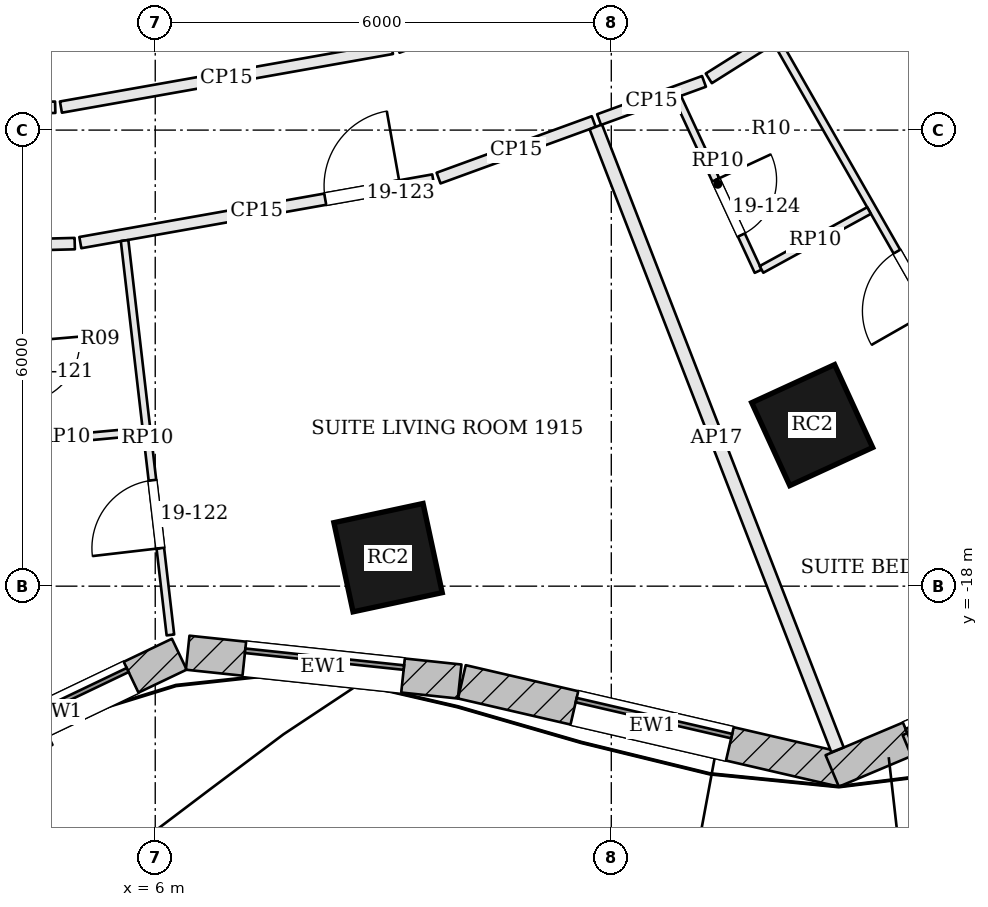
"""IFC4 building model, lengths in metres.
Left out: names, types, materials, properties, quantities, classifications, styles, units other than length and angle.
Written with IfcOpenShell. Run it as: python <this file> out.ifc"""

import sys

from ifc_helpers import new_model, si_unit, direction, frame, frame_2d, origin, origin_2d, place, context, subcontext, project, spatial, rectangle, extrude, element, fill, save


model = new_model("IFC4")
c1 = context("Model", 3, precision=1e-05, world=origin(), true_north=direction((0.0, 1.0)))
c2 = subcontext(c1, "Body", "Model", "MODEL_VIEW")
j1 = project(units=[si_unit("LENGTHUNIT", "METRE"), si_unit("PLANEANGLEUNIT", "RADIAN")], contexts=[c1])
p1 = place(None, origin())
s1 = spatial("IfcSite", under=j1, at=p1, CompositionType="ELEMENT")
p2 = place(p1, origin())
s2 = spatial("IfcBuilding", under=s1, at=p2, CompositionType="ELEMENT")
p3 = place(p2, frame((0.0, 0.0, 85.2)))
s3 = spatial("IfcBuildingStorey", under=s2, at=p3, CompositionType="ELEMENT", Elevation=85.2)
for number, where, z_axis, x_axis in (
    (1, (9.063, -17.625, 0.0), (0.0, 0.0, 1.0), (0.978, 0.21, 0.0)),
    (2, (14.643, -15.881, 0.0), (0.0, 0.0, 1.0), (0.909, 0.417, 0.0)),
):
    element("IfcColumn", number, at=place(p3, frame(where, z_axis=z_axis, x_axis=x_axis)), inside=s3, PredefinedType="COLUMN", context=c2, shape_type="SweptSolid", body=[
        extrude(rectangle(XDim=1.2, YDim=1.2, at=origin_2d()), origin(), (0.0, 0.0, 1.0), 3.6),
    ])
p4 = place(p3, frame((3.154, -20.406, 0.0), z_axis=(0.0, 0.0, 1.0), x_axis=(0.902333313, 0.431038968367, 0.0)))
e3 = element("IfcWall", 3, at=p4, inside=s3, PredefinedType="SOLIDWALL", context=c2, shape_type="SweptSolid", body=[
    extrude(rectangle(XDim=3.505, YDim=0.45, at=frame_2d((1.753, 0.0))), origin(), (0.0, 0.0, 1.0), 3.4),
])
p5 = place(p4, frame((0.703, 0.0, 0.9)))
e4 = element("IfcOpeningElement", 4, at=p5, cuts=e3, PredefinedType="OPENING", context=c2, shape_type="SweptSolid", body=[
    extrude(rectangle(XDim=2.1, YDim=2.0, at=frame_2d((1.05, 1.0))), frame((0.0, 0.235, 0.0), z_axis=(0.0, -1.0, 0.0), x_axis=(1.0, 0.0, 0.0)), (0.0, 0.0, 1.0), 0.47),
])
p6 = place(p3, frame((6.427, -18.875, 0.0), z_axis=(0.0, 0.0, 1.0), x_axis=(0.994433468803, -0.10536638992, 0.0)))
e5 = element("IfcWall", 5, at=p6, inside=s3, PredefinedType="SOLIDWALL", context=c2, shape_type="SweptSolid", body=[
    extrude(rectangle(XDim=3.598, YDim=0.45, at=frame_2d((1.799, 0.0))), origin(), (0.0, 0.0, 1.0), 3.4),
])
p7 = place(p6, frame((0.749, 0.0, 0.9)))
e6 = element("IfcOpeningElement", 6, at=p7, cuts=e5, PredefinedType="OPENING", context=c2, shape_type="SweptSolid", body=[
    extrude(rectangle(XDim=2.1, YDim=2.0, at=frame_2d((1.05, 1.0))), frame((0.0, 0.235, 0.0), z_axis=(0.0, -1.0, 0.0), x_axis=(1.0, 0.0, 0.0)), (0.0, 0.0, 1.0), 0.47),
])
p8 = place(p3, frame((10.034, -19.259, 0.0), z_axis=(0.0, 0.0, 1.0), x_axis=(0.974223567844, -0.225584662283, 0.0)))
e7 = element("IfcWall", 7, at=p8, inside=s3, PredefinedType="SOLIDWALL", context=c2, shape_type="SweptSolid", body=[
    extrude(rectangle(XDim=5.139, YDim=0.45, at=frame_2d((2.569, 0.0))), origin(), (0.0, 0.0, 1.0), 3.4),
])
p9 = place(p8, frame((1.519, 0.0, 0.9)))
e8 = element("IfcOpeningElement", 8, at=p9, cuts=e7, PredefinedType="OPENING", context=c2, shape_type="SweptSolid", body=[
    extrude(rectangle(XDim=2.1, YDim=2.0, at=frame_2d((1.05, 1.0))), frame((0.0, 0.235, 0.0), z_axis=(0.0, -1.0, 0.0), x_axis=(1.0, 0.0, 0.0)), (0.0, 0.0, 1.0), 0.47),
])
p10 = place(p3, frame((14.906, -20.431, 0.0), z_axis=(0.0, 0.0, 1.0), x_axis=(0.921435803521, 0.388530642279, 0.0)))
e9 = element("IfcWall", 9, at=p10, inside=s3, PredefinedType="SOLIDWALL", context=c2, shape_type="SweptSolid", body=[
    extrude(rectangle(XDim=4.309, YDim=0.45, at=frame_2d((2.154, 0.0))), origin(), (0.0, 0.0, 1.0), 3.4),
])
p11 = place(p10, frame((1.104, 0.0, 0.9)))
e10 = element("IfcOpeningElement", 10, at=p11, cuts=e9, PredefinedType="OPENING", context=c2, shape_type="SweptSolid", body=[
    extrude(rectangle(XDim=2.1, YDim=2.0, at=frame_2d((1.05, 1.0))), frame((0.0, 0.235, 0.0), z_axis=(0.0, -1.0, 0.0), x_axis=(1.0, 0.0, 0.0)), (0.0, 0.0, 1.0), 0.47),
])
p12 = place(p3, frame((3.239, -20.594, 3.6), z_axis=(0.0, 0.0, 1.0), x_axis=(0.902344893923, 0.431014724123, 0.0)))
e11 = element("IfcWall", 11, at=p12, inside=s3, PredefinedType="PARAPET", context=c2, shape_type="SweptSolid", body=[
    extrude(rectangle(XDim=1.49, YDim=0.3, at=frame_2d((0.745, 0.0))), origin(), (0.0, 0.0, 1.0), 1.1),
])
p13 = place(p3, frame((15.891, -20.097, 3.6), z_axis=(0.0, 0.0, 1.0), x_axis=(0.921468908678, 0.388452121038, 0.0)))
e12 = element("IfcWall", 12, at=p13, inside=s3, PredefinedType="PARAPET", context=c2, shape_type="SweptSolid", body=[
    extrude(rectangle(XDim=2.099, YDim=0.3, at=frame_2d((1.05, 0.0))), origin(), (0.0, 0.0, 1.0), 1.1),
])
p14 = place(p3, frame((-0.097, -13.624, 0.0), z_axis=(0.0, 0.0, 1.0), x_axis=(0.999664134342, 0.025915603618, 0.0)))
e13 = element("IfcWall", 13, at=p14, inside=s3, PredefinedType="PARTITIONING", context=c2, shape_type="SweptSolid", body=[
    extrude(rectangle(XDim=5.04, YDim=0.15, at=frame_2d((2.52, 0.0))), origin(), (0.0, 0.0, 1.0), 2.784),
])
p15 = place(p3, frame((5.015, -13.48, 0.0), z_axis=(0.0, 0.0, 1.0), x_axis=(0.984637772103, 0.174609443467, 0.0)))
e14 = element("IfcWall", 14, at=p15, inside=s3, PredefinedType="PARTITIONING", context=c2, shape_type="SweptSolid", body=[
    extrude(rectangle(XDim=4.715, YDim=0.15, at=frame_2d((2.357, 0.0))), origin(), (0.0, 0.0, 1.0), 2.784),
])
p16 = place(p15, frame((3.272, 0.0, 0.0)))
e15 = element("IfcOpeningElement", 15, at=p16, cuts=e14, PredefinedType="OPENING", context=c2, shape_type="SweptSolid", body=[
    extrude(rectangle(XDim=1.0, YDim=2.1, at=frame_2d((0.5, 1.05))), frame((0.0, 0.085, 0.0), z_axis=(0.0, -1.0, 0.0), x_axis=(1.0, 0.0, 0.0)), (0.0, 0.0, 1.0), 0.17),
])
p17 = place(p3, frame((9.728, -12.631, 0.0), z_axis=(0.0, 0.0, 1.0), x_axis=(0.939625968265, 0.342203214133, 0.0)))
e16 = element("IfcWall", 16, at=p17, inside=s3, PredefinedType="PARTITIONING", context=c2, shape_type="SweptSolid", body=[
    extrude(rectangle(XDim=2.172, YDim=0.15, at=frame_2d((1.086, 0.0))), origin(), (0.0, 0.0, 1.0), 2.784),
])
p18 = place(p3, frame((14.976, -20.153, 0.0), z_axis=(0.0, 0.0, 1.0), x_axis=(-0.361741189075, 0.932278559298, 0.0)))
e17 = element("IfcWall", 17, at=p18, inside=s3, PredefinedType="PARTITIONING", context=c2, shape_type="SweptSolid", body=[
    extrude(rectangle(XDim=8.791, YDim=0.175, at=frame_2d((4.395, 0.0))), origin(), (0.0, 0.0, 1.0), 2.784),
])
p19 = place(p3, frame((11.839, -11.862, 0.0), z_axis=(0.0, 0.0, 1.0), x_axis=(0.939613732968, 0.342236808099, 0.0)))
e18 = element("IfcWall", 18, at=p19, inside=s3, PredefinedType="PARTITIONING", context=c2, shape_type="SweptSolid", body=[
    extrude(rectangle(XDim=1.469, YDim=0.15, at=frame_2d((0.734, 0.0))), origin(), (0.0, 0.0, 1.0), 2.784),
])
p20 = place(p3, frame((13.283, -11.319, 0.0), z_axis=(0.0, 0.0, 1.0), x_axis=(0.84630789582, 0.532694044901, 0.0)))
e19 = element("IfcWall", 19, at=p20, inside=s3, PredefinedType="PARTITIONING", context=c2, shape_type="SweptSolid", body=[
    extrude(rectangle(XDim=3.53, YDim=0.15, at=frame_2d((1.765, 0.0))), origin(), (0.0, 0.0, 1.0), 2.784),
])
p21 = place(p20, frame((2.25, 0.0, 0.0)))
e20 = element("IfcOpeningElement", 20, at=p21, cuts=e19, PredefinedType="OPENING", context=c2, shape_type="SweptSolid", body=[
    extrude(rectangle(XDim=1.0, YDim=2.1, at=frame_2d((0.5, 1.05))), frame((0.0, 0.085, 0.0), z_axis=(0.0, -1.0, 0.0), x_axis=(1.0, 0.0, 0.0)), (0.0, 0.0, 1.0), 0.17),
])
p22 = place(p3, frame((9.115, -10.925, 0.0), z_axis=(0.0, 0.0, 1.0), x_axis=(-0.984632605417, -0.174638576352, 0.0)))
e21 = element("IfcWall", 21, at=p22, inside=s3, PredefinedType="PARTITIONING", context=c2, shape_type="SweptSolid", body=[
    extrude(rectangle(XDim=4.423, YDim=0.15, at=frame_2d((2.211, 0.0))), origin(), (0.0, 0.0, 1.0), 2.784),
])
p23 = place(p3, frame((4.684, -11.699, 0.0), z_axis=(0.0, 0.0, 1.0), x_axis=(-0.999663438204, -0.025942442425, 0.0)))
e22 = element("IfcWall", 22, at=p23, inside=s3, PredefinedType="PARTITIONING", context=c2, shape_type="SweptSolid", body=[
    extrude(rectangle(XDim=6.663, YDim=0.15, at=frame_2d((3.332, 0.0))), origin(), (0.0, 0.0, 1.0), 2.784),
])
p24 = place(p3, frame((6.199, -18.642, 0.0), z_axis=(0.0, 0.0, 1.0), x_axis=(-0.115390402635, 0.993320217744, 0.0)))
e23 = element("IfcWall", 23, at=p24, inside=s3, PredefinedType="PARTITIONING", context=c2, shape_type="SweptSolid", body=[
    extrude(rectangle(XDim=5.224, YDim=0.1, at=frame_2d((2.612, 0.0))), origin(), (0.0, 0.0, 1.0), 2.784),
])
p25 = place(p24, frame((1.149, 0.0, 0.0)))
e24 = element("IfcOpeningElement", 24, at=p25, cuts=e23, PredefinedType="OPENING", context=c2, shape_type="SweptSolid", body=[
    extrude(rectangle(XDim=0.9, YDim=2.4, at=frame_2d((0.45, 1.2))), frame((0.0, 0.06, 0.0), z_axis=(0.0, -1.0, 0.0), x_axis=(1.0, 0.0, 0.0)), (0.0, 0.0, 1.0), 0.12),
])
p26 = place(p3, frame((4.369, -16.101, 0.0), z_axis=(0.0, 0.0, 1.0), x_axis=(0.995788091421, 0.09168466057, 0.0)))
e25 = element("IfcWall", 25, at=p26, inside=s3, PredefinedType="PARTITIONING", context=c2, shape_type="SweptSolid", body=[
    extrude(rectangle(XDim=1.475, YDim=0.1, at=frame_2d((0.738, 0.0))), origin(), (0.0, 0.0, 1.0), 2.784),
])
p27 = place(p3, frame((18.622, -18.615, 0.0), z_axis=(0.0, 0.0, 1.0), x_axis=(-0.495924530613, 0.868365625723, 0.0)))
e26 = element("IfcWall", 26, at=p27, inside=s3, PredefinedType="PARTITIONING", context=c2, shape_type="SweptSolid", body=[
    extrude(rectangle(XDim=8.952, YDim=0.1, at=frame_2d((4.476, 0.0))), origin(), (0.0, 0.0, 1.0), 2.784),
])
p28 = place(p27, frame((4.877, 0.0, 0.0)))
e27 = element("IfcOpeningElement", 27, at=p28, cuts=e26, PredefinedType="OPENING", context=c2, shape_type="SweptSolid", body=[
    extrude(rectangle(XDim=0.9, YDim=2.4, at=frame_2d((0.45, 1.2))), frame((0.0, 0.06, 0.0), z_axis=(0.0, -1.0, 0.0), x_axis=(1.0, 0.0, 0.0)), (0.0, 0.0, 1.0), 0.12),
])
p29 = place(p3, frame((12.87, -11.566, 0.0), z_axis=(0.0, 0.0, 1.0), x_axis=(0.42076187936, -0.907171119953, 0.0)))
e28 = element("IfcWall", 28, at=p29, inside=s3, PredefinedType="PARTITIONING", context=c2, shape_type="SweptSolid", body=[
    extrude(rectangle(XDim=2.525, YDim=0.1, at=frame_2d((1.263, 0.0))), origin(), (0.0, 0.0, 1.0), 2.784),
])
p30 = place(p29, frame((1.2, 0.0, 0.0)))
e29 = element("IfcOpeningElement", 29, at=p30, cuts=e28, PredefinedType="OPENING", context=c2, shape_type="SweptSolid", body=[
    extrude(rectangle(XDim=0.8, YDim=2.1, at=frame_2d((0.4, 1.05))), frame((0.0, 0.06, 0.0), z_axis=(0.0, -1.0, 0.0), x_axis=(1.0, 0.0, 0.0)), (0.0, 0.0, 1.0), 0.12),
])
p31 = place(p3, frame((13.976, -13.833, 0.0), z_axis=(0.0, 0.0, 1.0), x_axis=(0.877160016476, 0.480198193975, 0.0)))
e30 = element("IfcWall", 30, at=p31, inside=s3, PredefinedType="PARTITIONING", context=c2, shape_type="SweptSolid", body=[
    extrude(rectangle(XDim=1.613, YDim=0.1, at=frame_2d((0.807, 0.0))), origin(), (0.0, 0.0, 1.0), 2.784),
])
p32 = place(p5, origin())
e31 = element("IfcWindow", 31, at=p32, inside=s3, PartitioningType="SINGLE_PANEL", PredefinedType="WINDOW", context=c2, shape_type="SweptSolid", body=[
    extrude(rectangle(XDim=2.1, YDim=2.0, at=frame_2d((1.05, 1.0))), frame((0.0, 0.135, 0.0), z_axis=(0.0, -1.0, 0.0), x_axis=(1.0, 0.0, 0.0)), (0.0, 0.0, 1.0), 0.06),
])
fill(e4, e31)
p33 = place(p7, origin())
e32 = element("IfcWindow", 32, at=p33, inside=s3, PartitioningType="SINGLE_PANEL", PredefinedType="WINDOW", context=c2, shape_type="SweptSolid", body=[
    extrude(rectangle(XDim=2.1, YDim=2.0, at=frame_2d((1.05, 1.0))), frame((0.0, 0.135, 0.0), z_axis=(0.0, -1.0, 0.0), x_axis=(1.0, 0.0, 0.0)), (0.0, 0.0, 1.0), 0.06),
])
fill(e6, e32)
p34 = place(p9, origin())
e33 = element("IfcWindow", 33, at=p34, inside=s3, PartitioningType="SINGLE_PANEL", PredefinedType="WINDOW", context=c2, shape_type="SweptSolid", body=[
    extrude(rectangle(XDim=2.1, YDim=2.0, at=frame_2d((1.05, 1.0))), frame((0.0, 0.135, 0.0), z_axis=(0.0, -1.0, 0.0), x_axis=(1.0, 0.0, 0.0)), (0.0, 0.0, 1.0), 0.06),
])
fill(e8, e33)
p35 = place(p11, origin())
e34 = element("IfcWindow", 34, at=p35, inside=s3, PartitioningType="SINGLE_PANEL", PredefinedType="WINDOW", context=c2, shape_type="SweptSolid", body=[
    extrude(rectangle(XDim=2.1, YDim=2.0, at=frame_2d((1.05, 1.0))), frame((0.0, 0.135, 0.0), z_axis=(0.0, -1.0, 0.0), x_axis=(1.0, 0.0, 0.0)), (0.0, 0.0, 1.0), 0.06),
])
fill(e10, e34)
p36 = place(p25, origin())
e35 = element("IfcDoor", 35, at=p36, inside=s3, OperationType="SINGLE_SWING_LEFT", PredefinedType="DOOR", context=c2, shape_type="SweptSolid", body=[
    extrude(rectangle(XDim=0.9, YDim=2.4, at=frame_2d((0.45, 1.2))), frame((0.0, 0.025, 0.0), z_axis=(0.0, -1.0, 0.0), x_axis=(1.0, 0.0, 0.0)), (0.0, 0.0, 1.0), 0.05),
])
fill(e24, e35)
p37 = place(p16, origin())
e36 = element("IfcDoor", 36, at=p37, inside=s3, OperationType="SINGLE_SWING_RIGHT", PredefinedType="DOOR", context=c2, shape_type="SweptSolid", body=[
    extrude(rectangle(XDim=1.0, YDim=2.1, at=frame_2d((0.5, 1.05))), frame((0.0, 0.025, 0.0), z_axis=(0.0, -1.0, 0.0), x_axis=(1.0, 0.0, 0.0)), (0.0, 0.0, 1.0), 0.05),
])
fill(e15, e36)
p38 = place(p30, origin())
e37 = element("IfcDoor", 37, at=p38, inside=s3, OperationType="SINGLE_SWING_LEFT", PredefinedType="DOOR", context=c2, shape_type="SweptSolid", body=[
    extrude(rectangle(XDim=0.8, YDim=2.1, at=frame_2d((0.4, 1.05))), frame((0.0, 0.025, 0.0), z_axis=(0.0, -1.0, 0.0), x_axis=(1.0, 0.0, 0.0)), (0.0, 0.0, 1.0), 0.05),
])
fill(e29, e37)
p39 = place(p28, origin())
e38 = element("IfcDoor", 38, at=p39, inside=s3, OperationType="SINGLE_SWING_LEFT", PredefinedType="DOOR", context=c2, shape_type="SweptSolid", body=[
    extrude(rectangle(XDim=0.9, YDim=2.4, at=frame_2d((0.45, 1.2))), frame((0.0, 0.025, 0.0), z_axis=(0.0, -1.0, 0.0), x_axis=(1.0, 0.0, 0.0)), (0.0, 0.0, 1.0), 0.05),
])
fill(e27, e38)
save(model, sys.argv[1])
